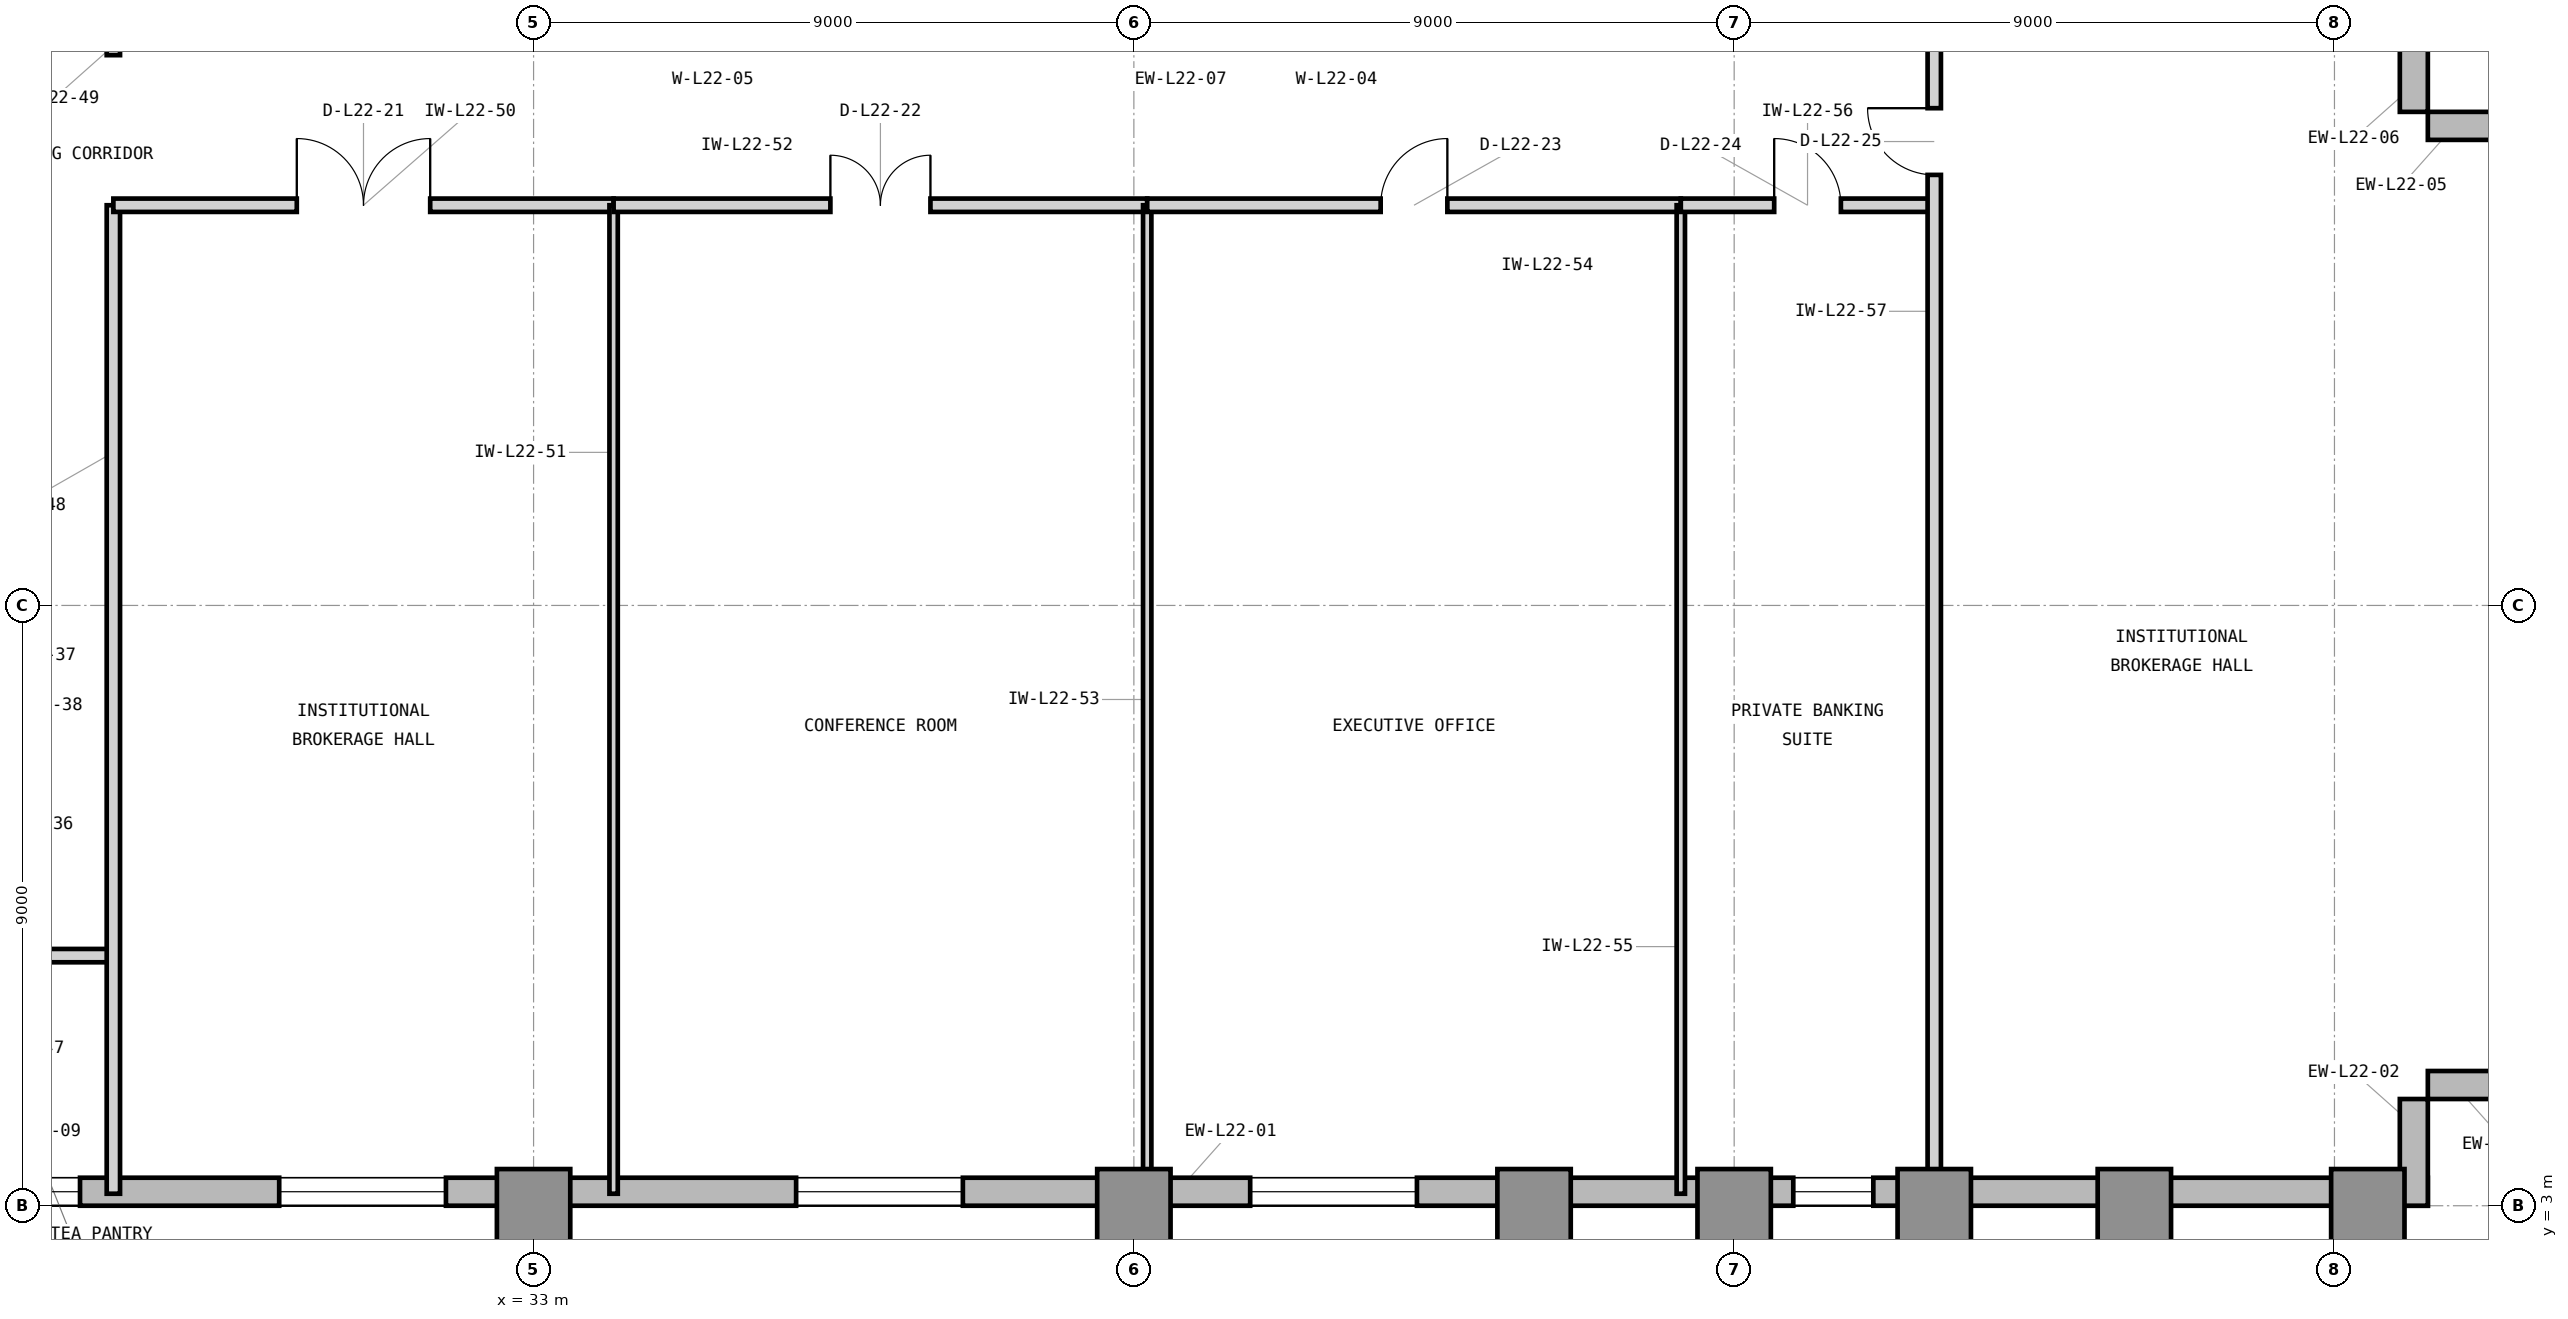
"""IFC4 building model, lengths in metres.
Left out: names, types, materials, properties, quantities, classifications, styles, units other than length and angle.
Written with IfcOpenShell. Run it as: python <this file> out.ifc"""

import sys

from ifc_helpers import new_model, si_unit, direction, frame, frame_2d, origin, origin_2d, place, context, subcontext, project, spatial, rectangle, extrude, element, fill, save


model = new_model("IFC4")
c1 = context("Model", 3, precision=1e-05, world=origin(), true_north=direction((0.0, 1.0)))
c2 = subcontext(c1, "Body", "Model", "MODEL_VIEW")
j1 = project(units=[si_unit("LENGTHUNIT", "METRE"), si_unit("PLANEANGLEUNIT", "RADIAN")], contexts=[c1])
p1 = place(None, origin())
s1 = spatial("IfcSite", under=j1, at=p1, CompositionType="ELEMENT")
p2 = place(p1, origin())
s2 = spatial("IfcBuilding", under=s1, at=p2, CompositionType="ELEMENT")
p3 = place(p2, frame((0.0, 0.0, 97.2)))
s3 = spatial("IfcBuildingStorey", under=s2, at=p3, CompositionType="ELEMENT", Elevation=97.2)
for number, where, z_axis, x_axis in (
    (1, (33.0, 3.0, 0.0), (0.0, 0.0, 1.0), (1.0, 0.0, 0.0)),
    (2, (42.0, 3.0, 0.0), (0.0, 0.0, 1.0), (1.0, 0.0, 0.0)),
    (3, (48.0, 3.0, 0.0), (0.0, 0.0, 1.0), (1.0, 0.0, 0.0)),
    (4, (51.0, 3.0, 0.0), (0.0, 0.0, 1.0), (1.0, 0.0, 0.0)),
    (5, (54.0, 3.0, 0.0), (0.0, 0.0, 1.0), (1.0, 0.0, 0.0)),
    (6, (57.0, 3.0, 0.0), (0.0, 0.0, 1.0), (1.0, 0.0, 0.0)),
    (7, (60.5, 3.0, 0.0), (0.0, 0.0, 1.0), (1.0, 0.0, 0.0)),
):
    element("IfcColumn", number, at=place(p3, frame(where, z_axis=z_axis, x_axis=x_axis)), inside=s3, PredefinedType="COLUMN", context=c2, shape_type="SweptSolid", body=[
        extrude(rectangle(XDim=1.1, YDim=1.1, at=origin_2d()), origin(), (0.0, 0.0, 1.0), 3.9),
    ])
p4 = place(p3, frame((23.9, 3.21, 0.0), z_axis=(0.0, 0.0, 1.0), x_axis=(1.0, 0.0, 0.0)))
e8 = element("IfcWall", 8, at=p4, inside=s3, PredefinedType="STANDARD", context=c2, shape_type="SweptSolid", body=[
    extrude(rectangle(XDim=37.5, YDim=0.42, at=frame_2d((18.75, 0.0))), origin(), (0.0, 0.0, 1.0), 3.7),
])
p5 = place(p4, frame((19.844, 0.0, 0.85)))
e9 = element("IfcOpeningElement", 9, at=p5, cuts=e8, PredefinedType="OPENING", context=c2, shape_type="SweptSolid", body=[
    extrude(rectangle(XDim=2.5, YDim=2.25, at=frame_2d((1.25, 1.125))), frame((0.0, 0.22, 0.0), z_axis=(0.0, -1.0, 0.0), x_axis=(1.0, 0.0, 0.0)), (0.0, 0.0, 1.0), 0.44),
])
p6 = place(p4, frame((1.1, 0.0, 0.85)))
e10 = element("IfcOpeningElement", 10, at=p6, cuts=e8, PredefinedType="OPENING", context=c2, shape_type="SweptSolid", body=[
    extrude(rectangle(XDim=1.2, YDim=2.25, at=frame_2d((0.6, 1.125))), frame((0.0, 0.22, 0.0), z_axis=(0.0, -1.0, 0.0), x_axis=(1.0, 0.0, 0.0)), (0.0, 0.0, 1.0), 0.44),
])
p7 = place(p4, frame((5.286, 0.0, 0.85)))
e11 = element("IfcOpeningElement", 11, at=p7, cuts=e8, PredefinedType="OPENING", context=c2, shape_type="SweptSolid", body=[
    extrude(rectangle(XDim=2.5, YDim=2.25, at=frame_2d((1.25, 1.125))), frame((0.0, 0.22, 0.0), z_axis=(0.0, -1.0, 0.0), x_axis=(1.0, 0.0, 0.0)), (0.0, 0.0, 1.0), 0.44),
])
p8 = place(p4, frame((13.036, 0.0, 0.85)))
e12 = element("IfcOpeningElement", 12, at=p8, cuts=e8, PredefinedType="OPENING", context=c2, shape_type="SweptSolid", body=[
    extrude(rectangle(XDim=2.5, YDim=2.25, at=frame_2d((1.25, 1.125))), frame((0.0, 0.22, 0.0), z_axis=(0.0, -1.0, 0.0), x_axis=(1.0, 0.0, 0.0)), (0.0, 0.0, 1.0), 0.44),
])
p9 = place(p4, frame((27.986, 0.0, 0.85)))
e13 = element("IfcOpeningElement", 13, at=p9, cuts=e8, PredefinedType="OPENING", context=c2, shape_type="SweptSolid", body=[
    extrude(rectangle(XDim=1.2, YDim=2.25, at=frame_2d((0.6, 1.125))), frame((0.0, 0.22, 0.0), z_axis=(0.0, -1.0, 0.0), x_axis=(1.0, 0.0, 0.0)), (0.0, 0.0, 1.0), 0.44),
])
for number, where, z_axis, x_axis in (
    (14, (61.19, 3.0, 0.0), (0.0, 0.0, 1.0), (0.0, 1.0, 0.0)),
    (15, (61.4, 4.81, 0.0), (0.0, 0.0, 1.0), (1.0, 0.0, 0.0)),
    (16, (63.0, 19.19, 0.0), (0.0, 0.0, 1.0), (-1.0, 0.0, 0.0)),
    (17, (61.19, 19.4, 0.0), (0.0, 0.0, 1.0), (0.0, 1.0, 0.0)),
):
    element("IfcWall", number, at=place(p3, frame(where, z_axis=z_axis, x_axis=x_axis)), inside=s3, PredefinedType="STANDARD", context=c2, shape_type="SweptSolid", body=[
        extrude(rectangle(XDim=1.6, YDim=0.42, at=frame_2d((0.8, 0.0))), origin(), (0.0, 0.0, 1.0), 3.7),
    ])
p10 = place(p3, frame((23.85, 6.75, 0.0), z_axis=(0.0, 0.0, 1.0), x_axis=(1.0, 0.0, 0.0)))
e18 = element("IfcWall", 18, at=p10, inside=s3, PredefinedType="PARTITIONING", context=c2, shape_type="SweptSolid", body=[
    extrude(rectangle(XDim=2.85, YDim=0.2, at=frame_2d((1.425, 0.0))), origin(), (0.0, 0.0, 1.0), 3.69),
])
p11 = place(p10, frame((0.7, 0.0, 0.0)))
e19 = element("IfcOpeningElement", 19, at=p11, cuts=e18, PredefinedType="OPENING", context=c2, shape_type="SweptSolid", body=[
    extrude(rectangle(XDim=1.0, YDim=2.15, at=frame_2d((0.5, 1.075))), frame((0.0, 0.11, 0.0), z_axis=(0.0, -1.0, 0.0), x_axis=(1.0, 0.0, 0.0)), (0.0, 0.0, 1.0), 0.22),
])
p12 = place(p3, frame((26.7, 3.18, 0.0), z_axis=(0.0, 0.0, 1.0), x_axis=(0.0, 1.0, 0.0)))
e20 = element("IfcWall", 20, at=p12, inside=s3, PredefinedType="PARTITIONING", context=c2, shape_type="SweptSolid", body=[
    extrude(rectangle(XDim=14.82, YDim=0.2, at=frame_2d((7.41, 0.0))), origin(), (0.0, 0.0, 1.0), 3.69),
])
p13 = place(p3, frame((26.7, 20.25, 0.0), z_axis=(0.0, 0.0, 1.0), x_axis=(0.0, 1.0, 0.0)))
e21 = element("IfcWall", 21, at=p13, inside=s3, PredefinedType="PARTITIONING", context=c2, shape_type="SweptSolid", body=[
    extrude(rectangle(XDim=0.57, YDim=0.2, at=frame_2d((0.285, 0.0))), origin(), (0.0, 0.0, 1.0), 3.69),
])
p14 = place(p3, frame((26.7, 18.0, 0.0), z_axis=(0.0, 0.0, 1.0), x_axis=(1.0, 0.0, 0.0)))
e22 = element("IfcWall", 22, at=p14, inside=s3, PredefinedType="PARTITIONING", context=c2, shape_type="SweptSolid", body=[
    extrude(rectangle(XDim=7.5, YDim=0.2, at=frame_2d((3.75, 0.0))), origin(), (0.0, 0.0, 1.0), 3.227),
])
p15 = place(p14, frame((2.75, 0.0, 0.0)))
e23 = element("IfcOpeningElement", 23, at=p15, cuts=e22, PredefinedType="OPENING", context=c2, shape_type="SweptSolid", body=[
    extrude(rectangle(XDim=2.0, YDim=2.5, at=frame_2d((1.0, 1.25))), frame((0.0, 0.11, 0.0), z_axis=(0.0, -1.0, 0.0), x_axis=(1.0, 0.0, 0.0)), (0.0, 0.0, 1.0), 0.22),
])
p16 = place(p3, frame((34.2, 3.18, 0.0), z_axis=(0.0, 0.0, 1.0), x_axis=(0.0, 1.0, 0.0)))
e24 = element("IfcWall", 24, at=p16, inside=s3, PredefinedType="PARTITIONING", context=c2, shape_type="SweptSolid", body=[
    extrude(rectangle(XDim=14.82, YDim=0.125, at=frame_2d((7.41, 0.0))), origin(), (0.0, 0.0, 1.0), 3.69),
])
p17 = place(p3, frame((34.2, 18.0, 0.0), z_axis=(0.0, 0.0, 1.0), x_axis=(1.0, 0.0, 0.0)))
e25 = element("IfcWall", 25, at=p17, inside=s3, PredefinedType="PARTITIONING", context=c2, shape_type="SweptSolid", body=[
    extrude(rectangle(XDim=8.0, YDim=0.2, at=frame_2d((4.0, 0.0))), origin(), (0.0, 0.0, 1.0), 3.227),
])
p18 = place(p17, frame((3.25, 0.0, 0.0)))
e26 = element("IfcOpeningElement", 26, at=p18, cuts=e25, PredefinedType="OPENING", context=c2, shape_type="SweptSolid", body=[
    extrude(rectangle(XDim=1.5, YDim=2.3, at=frame_2d((0.75, 1.15))), frame((0.0, 0.11, 0.0), z_axis=(0.0, -1.0, 0.0), x_axis=(1.0, 0.0, 0.0)), (0.0, 0.0, 1.0), 0.22),
])
p19 = place(p3, frame((42.2, 3.18, 0.0), z_axis=(0.0, 0.0, 1.0), x_axis=(0.0, 1.0, 0.0)))
e27 = element("IfcWall", 27, at=p19, inside=s3, PredefinedType="PARTITIONING", context=c2, shape_type="SweptSolid", body=[
    extrude(rectangle(XDim=14.82, YDim=0.125, at=frame_2d((7.41, 0.0))), origin(), (0.0, 0.0, 1.0), 3.69),
])
p20 = place(p3, frame((42.2, 18.0, 0.0), z_axis=(0.0, 0.0, 1.0), x_axis=(1.0, 0.0, 0.0)))
e28 = element("IfcWall", 28, at=p20, inside=s3, PredefinedType="PARTITIONING", context=c2, shape_type="SweptSolid", body=[
    extrude(rectangle(XDim=8.0, YDim=0.2, at=frame_2d((4.0, 0.0))), origin(), (0.0, 0.0, 1.0), 3.227),
])
p21 = place(p20, frame((3.5, 0.0, 0.0)))
e29 = element("IfcOpeningElement", 29, at=p21, cuts=e28, PredefinedType="OPENING", context=c2, shape_type="SweptSolid", body=[
    extrude(rectangle(XDim=1.0, YDim=2.15, at=frame_2d((0.5, 1.075))), frame((0.0, 0.11, 0.0), z_axis=(0.0, -1.0, 0.0), x_axis=(1.0, 0.0, 0.0)), (0.0, 0.0, 1.0), 0.22),
])
p22 = place(p3, frame((50.2, 3.18, 0.0), z_axis=(0.0, 0.0, 1.0), x_axis=(0.0, 1.0, 0.0)))
e30 = element("IfcWall", 30, at=p22, inside=s3, PredefinedType="PARTITIONING", context=c2, shape_type="SweptSolid", body=[
    extrude(rectangle(XDim=14.82, YDim=0.125, at=frame_2d((7.41, 0.0))), origin(), (0.0, 0.0, 1.0), 3.69),
])
p23 = place(p3, frame((50.2, 18.0, 0.0), z_axis=(0.0, 0.0, 1.0), x_axis=(1.0, 0.0, 0.0)))
e31 = element("IfcWall", 31, at=p23, inside=s3, PredefinedType="PARTITIONING", context=c2, shape_type="SweptSolid", body=[
    extrude(rectangle(XDim=3.8, YDim=0.2, at=frame_2d((1.9, 0.0))), origin(), (0.0, 0.0, 1.0), 3.227),
])
p24 = place(p23, frame((1.4, 0.0, 0.0)))
e32 = element("IfcOpeningElement", 32, at=p24, cuts=e31, PredefinedType="OPENING", context=c2, shape_type="SweptSolid", body=[
    extrude(rectangle(XDim=1.0, YDim=2.15, at=frame_2d((0.5, 1.075))), frame((0.0, 0.11, 0.0), z_axis=(0.0, -1.0, 0.0), x_axis=(1.0, 0.0, 0.0)), (0.0, 0.0, 1.0), 0.22),
])
p25 = place(p3, frame((54.0, 3.18, 0.0), z_axis=(0.0, 0.0, 1.0), x_axis=(0.0, 1.0, 0.0)))
e33 = element("IfcWall", 33, at=p25, inside=s3, PredefinedType="PARTITIONING", context=c2, shape_type="SweptSolid", body=[
    extrude(rectangle(XDim=17.64, YDim=0.2, at=frame_2d((8.82, 0.0))), origin(), (0.0, 0.0, 1.0), 2.917),
])
p26 = place(p25, frame((15.275, 0.0, 0.0)))
e34 = element("IfcOpeningElement", 34, at=p26, cuts=e33, PredefinedType="OPENING", context=c2, shape_type="SweptSolid", body=[
    extrude(rectangle(XDim=1.0, YDim=2.15, at=frame_2d((0.5, 1.075))), frame((0.0, 0.11, 0.0), z_axis=(0.0, -1.0, 0.0), x_axis=(1.0, 0.0, 0.0)), (0.0, 0.0, 1.0), 0.22),
])
p27 = place(p5, origin())
e35 = element("IfcWindow", 35, at=p27, inside=s3, PartitioningType="SINGLE_PANEL", PredefinedType="WINDOW", context=c2, shape_type="SweptSolid", body=[
    extrude(rectangle(XDim=2.5, YDim=2.25, at=frame_2d((1.25, 1.125))), frame((0.0, 0.11, 0.0), z_axis=(0.0, -1.0, 0.0), x_axis=(1.0, 0.0, 0.0)), (0.0, 0.0, 1.0), 0.06),
])
fill(e9, e35)
p28 = place(p15, origin())
e36 = element("IfcDoor", 36, at=p28, inside=s3, OperationType="DOUBLE_DOOR_SINGLE_SWING", PredefinedType="DOOR", context=c2, shape_type="SweptSolid", body=[
    extrude(rectangle(XDim=2.0, YDim=2.5, at=frame_2d((1.0, 1.25))), frame((0.0, 0.025, 0.0), z_axis=(0.0, -1.0, 0.0), x_axis=(1.0, 0.0, 0.0)), (0.0, 0.0, 1.0), 0.05),
])
fill(e23, e36)
p29 = place(p18, origin())
e37 = element("IfcDoor", 37, at=p29, inside=s3, OperationType="DOUBLE_DOOR_SINGLE_SWING", PredefinedType="DOOR", context=c2, shape_type="SweptSolid", body=[
    extrude(rectangle(XDim=1.5, YDim=2.3, at=frame_2d((0.75, 1.15))), frame((0.0, 0.025, 0.0), z_axis=(0.0, -1.0, 0.0), x_axis=(1.0, 0.0, 0.0)), (0.0, 0.0, 1.0), 0.05),
])
fill(e26, e37)
p30 = place(p21, origin())
e38 = element("IfcDoor", 38, at=p30, inside=s3, OperationType="SINGLE_SWING_RIGHT", PredefinedType="DOOR", context=c2, shape_type="SweptSolid", body=[
    extrude(rectangle(XDim=1.0, YDim=2.15, at=frame_2d((0.5, 1.075))), frame((0.0, 0.025, 0.0), z_axis=(0.0, -1.0, 0.0), x_axis=(1.0, 0.0, 0.0)), (0.0, 0.0, 1.0), 0.05),
])
fill(e29, e38)
p31 = place(p24, origin())
e39 = element("IfcDoor", 39, at=p31, inside=s3, OperationType="SINGLE_SWING_LEFT", PredefinedType="DOOR", context=c2, shape_type="SweptSolid", body=[
    extrude(rectangle(XDim=1.0, YDim=2.15, at=frame_2d((0.5, 1.075))), frame((0.0, 0.025, 0.0), z_axis=(0.0, -1.0, 0.0), x_axis=(1.0, 0.0, 0.0)), (0.0, 0.0, 1.0), 0.05),
])
fill(e32, e39)
p32 = place(p26, origin())
e40 = element("IfcDoor", 40, at=p32, inside=s3, OperationType="SINGLE_SWING_RIGHT", PredefinedType="DOOR", context=c2, shape_type="SweptSolid", body=[
    extrude(rectangle(XDim=1.0, YDim=2.15, at=frame_2d((0.5, 1.075))), frame((0.0, 0.025, 0.0), z_axis=(0.0, -1.0, 0.0), x_axis=(1.0, 0.0, 0.0)), (0.0, 0.0, 1.0), 0.05),
])
fill(e34, e40)
p33 = place(p6, origin())
e41 = element("IfcWindow", 41, at=p33, inside=s3, PartitioningType="SINGLE_PANEL", PredefinedType="WINDOW", context=c2, shape_type="SweptSolid", body=[
    extrude(rectangle(XDim=1.2, YDim=2.25, at=frame_2d((0.6, 1.125))), frame((0.0, 0.11, 0.0), z_axis=(0.0, -1.0, 0.0), x_axis=(1.0, 0.0, 0.0)), (0.0, 0.0, 1.0), 0.06),
])
fill(e10, e41)
p34 = place(p7, origin())
e42 = element("IfcWindow", 42, at=p34, inside=s3, PartitioningType="SINGLE_PANEL", PredefinedType="WINDOW", context=c2, shape_type="SweptSolid", body=[
    extrude(rectangle(XDim=2.5, YDim=2.25, at=frame_2d((1.25, 1.125))), frame((0.0, 0.11, 0.0), z_axis=(0.0, -1.0, 0.0), x_axis=(1.0, 0.0, 0.0)), (0.0, 0.0, 1.0), 0.06),
])
fill(e11, e42)
p35 = place(p8, origin())
e43 = element("IfcWindow", 43, at=p35, inside=s3, PartitioningType="SINGLE_PANEL", PredefinedType="WINDOW", context=c2, shape_type="SweptSolid", body=[
    extrude(rectangle(XDim=2.5, YDim=2.25, at=frame_2d((1.25, 1.125))), frame((0.0, 0.11, 0.0), z_axis=(0.0, -1.0, 0.0), x_axis=(1.0, 0.0, 0.0)), (0.0, 0.0, 1.0), 0.06),
])
fill(e12, e43)
p36 = place(p9, origin())
e44 = element("IfcWindow", 44, at=p36, inside=s3, PartitioningType="SINGLE_PANEL", PredefinedType="WINDOW", context=c2, shape_type="SweptSolid", body=[
    extrude(rectangle(XDim=1.2, YDim=2.25, at=frame_2d((0.6, 1.125))), frame((0.0, 0.11, 0.0), z_axis=(0.0, -1.0, 0.0), x_axis=(1.0, 0.0, 0.0)), (0.0, 0.0, 1.0), 0.06),
])
fill(e13, e44)
save(model, sys.argv[1])
